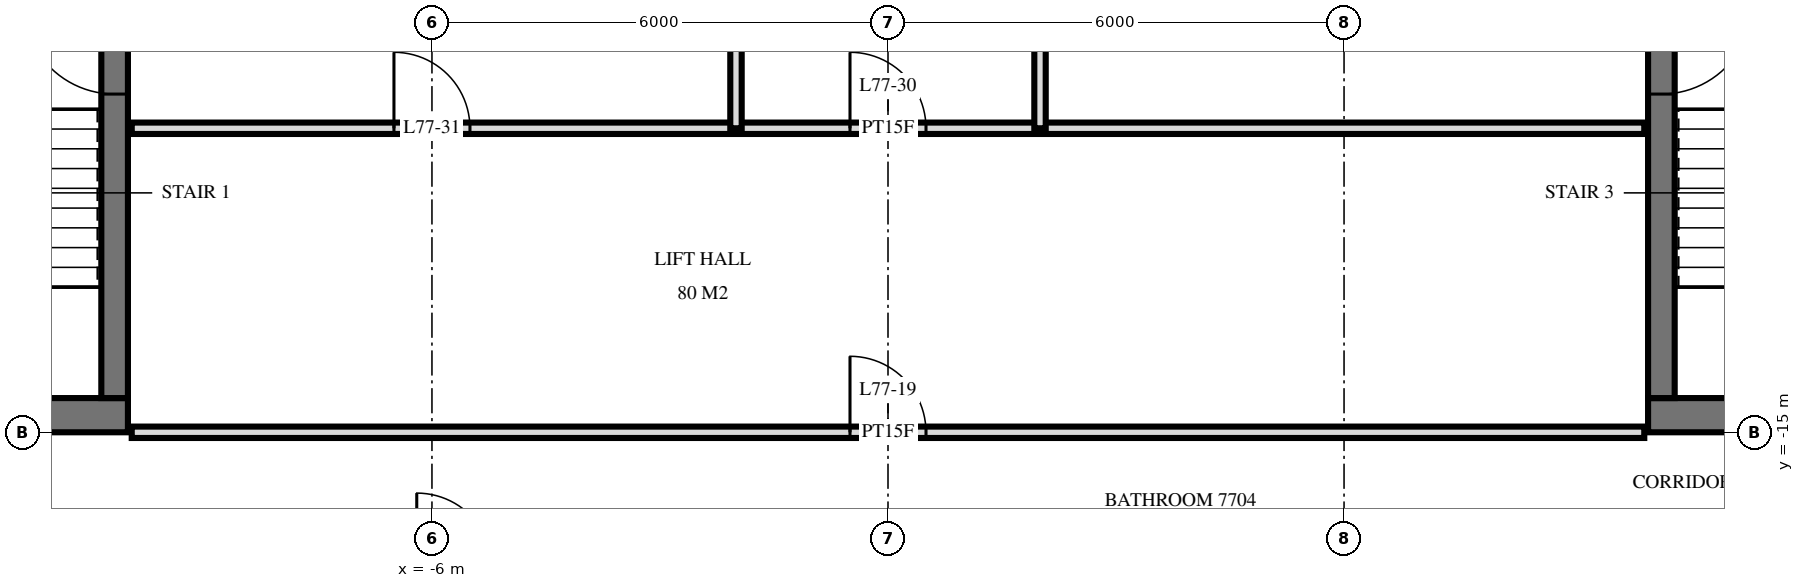
"""IFC4 building model, lengths in metres.
Left out: names, types, materials, properties, quantities, classifications, styles, units other than length and angle.
Written with IfcOpenShell. Run it as: python <this file> out.ifc"""

import sys

from ifc_helpers import new_model, si_unit, direction, frame, frame_2d, origin, place, context, subcontext, project, spatial, rectangle, extrude, element, fill, save


model = new_model("IFC4")
c1 = context("Model", 3, precision=1e-05, world=origin(), true_north=direction((0.0, 1.0)))
c2 = subcontext(c1, "Body", "Model", "MODEL_VIEW")
j1 = project(units=[si_unit("LENGTHUNIT", "METRE"), si_unit("PLANEANGLEUNIT", "RADIAN")], contexts=[c1])
p1 = place(None, origin())
s1 = spatial("IfcSite", under=j1, at=p1, CompositionType="ELEMENT")
p2 = place(p1, origin())
s2 = spatial("IfcBuilding", under=s1, at=p2, CompositionType="ELEMENT")
p3 = place(p2, frame((0.0, 0.0, 291.1)))
s3 = spatial("IfcBuildingStorey", under=s2, at=p3, CompositionType="ELEMENT", Elevation=291.1)
p4 = place(p3, frame((-19.5, -14.775, 0.0), z_axis=(0.0, 0.0, 1.0), x_axis=(1.0, 0.0, 0.0)))
e1 = element("IfcWall", 1, at=p4, inside=s3, PredefinedType="SHEAR", context=c2, shape_type="SweptSolid", body=[
    extrude(rectangle(XDim=9.5, YDim=0.45, at=frame_2d((4.75, 0.0))), origin(), (0.0, 0.0, 1.0), 3.5),
])
p5 = place(p4, frame((1.2, 0.0, 0.0)))
e2 = element("IfcOpeningElement", 2, at=p5, cuts=e1, PredefinedType="OPENING", context=c2, shape_type="SweptSolid", body=[
    extrude(rectangle(XDim=1.2, YDim=2.1, at=frame_2d((0.6, 1.05))), frame((0.0, 0.235, 0.0), z_axis=(0.0, -1.0, 0.0), x_axis=(1.0, 0.0, 0.0)), (0.0, 0.0, 1.0), 0.47),
])
p6 = place(p4, frame((4.25, 0.0, 0.0)))
e3 = element("IfcOpeningElement", 3, at=p6, cuts=e1, PredefinedType="OPENING", context=c2, shape_type="SweptSolid", body=[
    extrude(rectangle(XDim=1.1, YDim=2.1, at=frame_2d((0.55, 1.05))), frame((0.0, 0.235, 0.0), z_axis=(0.0, -1.0, 0.0), x_axis=(1.0, 0.0, 0.0)), (0.0, 0.0, 1.0), 0.47),
])
p7 = place(p3, frame((-10.175, -14.55, 0.0), z_axis=(0.0, 0.0, 1.0), x_axis=(0.0, 1.0, 0.0)))
e4 = element("IfcWall", 4, at=p7, inside=s3, PredefinedType="SHEAR", context=c2, shape_type="SweptSolid", body=[
    extrude(rectangle(XDim=14.1, YDim=0.35, at=frame_2d((7.05, 0.0))), origin(), (0.0, 0.0, 1.0), 3.5),
])
p8 = place(p7, frame((8.4, 0.0, 0.0)))
e5 = element("IfcOpeningElement", 5, at=p8, cuts=e4, PredefinedType="OPENING", context=c2, shape_type="SweptSolid", body=[
    extrude(rectangle(XDim=1.4, YDim=2.4, at=frame_2d((0.7, 1.2))), frame((0.0, 0.185, 0.0), z_axis=(0.0, -1.0, 0.0), x_axis=(1.0, 0.0, 0.0)), (0.0, 0.0, 1.0), 0.37),
])
p9 = place(p7, frame((10.0, 0.0, 0.0)))
e6 = element("IfcOpeningElement", 6, at=p9, cuts=e4, PredefinedType="OPENING", context=c2, shape_type="SweptSolid", body=[
    extrude(rectangle(XDim=1.4, YDim=2.4, at=frame_2d((0.7, 1.2))), frame((0.0, 0.185, 0.0), z_axis=(0.0, -1.0, 0.0), x_axis=(1.0, 0.0, 0.0)), (0.0, 0.0, 1.0), 0.37),
])
p10 = place(p7, frame((4.0, 0.0, 0.0)))
e7 = element("IfcOpeningElement", 7, at=p10, cuts=e4, PredefinedType="OPENING", context=c2, shape_type="SweptSolid", body=[
    extrude(rectangle(XDim=1.2, YDim=2.1, at=frame_2d((0.6, 1.05))), frame((0.0, 0.185, 0.0), z_axis=(0.0, -1.0, 0.0), x_axis=(1.0, 0.0, 0.0)), (0.0, 0.0, 1.0), 0.37),
])
p11 = place(p3, frame((10.0, -14.775, 0.0), z_axis=(0.0, 0.0, 1.0), x_axis=(1.0, 0.0, 0.0)))
e8 = element("IfcWall", 8, at=p11, inside=s3, PredefinedType="SHEAR", context=c2, shape_type="SweptSolid", body=[
    extrude(rectangle(XDim=9.5, YDim=0.45, at=frame_2d((4.75, 0.0))), origin(), (0.0, 0.0, 1.0), 3.5),
])
p12 = place(p11, frame((7.1, 0.0, 0.0)))
e9 = element("IfcOpeningElement", 9, at=p12, cuts=e8, PredefinedType="OPENING", context=c2, shape_type="SweptSolid", body=[
    extrude(rectangle(XDim=1.2, YDim=2.1, at=frame_2d((0.6, 1.05))), frame((0.0, 0.235, 0.0), z_axis=(0.0, -1.0, 0.0), x_axis=(1.0, 0.0, 0.0)), (0.0, 0.0, 1.0), 0.47),
])
p13 = place(p11, frame((4.15, 0.0, 0.0)))
e10 = element("IfcOpeningElement", 10, at=p13, cuts=e8, PredefinedType="OPENING", context=c2, shape_type="SweptSolid", body=[
    extrude(rectangle(XDim=1.1, YDim=2.1, at=frame_2d((0.55, 1.05))), frame((0.0, 0.235, 0.0), z_axis=(0.0, -1.0, 0.0), x_axis=(1.0, 0.0, 0.0)), (0.0, 0.0, 1.0), 0.47),
])
p14 = place(p3, frame((10.175, -14.55, 0.0), z_axis=(0.0, 0.0, 1.0), x_axis=(0.0, 1.0, 0.0)))
e11 = element("IfcWall", 11, at=p14, inside=s3, PredefinedType="SHEAR", context=c2, shape_type="SweptSolid", body=[
    extrude(rectangle(XDim=14.1, YDim=0.35, at=frame_2d((7.05, 0.0))), origin(), (0.0, 0.0, 1.0), 3.5),
])
p15 = place(p14, frame((8.4, 0.0, 0.0)))
e12 = element("IfcOpeningElement", 12, at=p15, cuts=e11, PredefinedType="OPENING", context=c2, shape_type="SweptSolid", body=[
    extrude(rectangle(XDim=1.4, YDim=2.4, at=frame_2d((0.7, 1.2))), frame((0.0, 0.185, 0.0), z_axis=(0.0, -1.0, 0.0), x_axis=(1.0, 0.0, 0.0)), (0.0, 0.0, 1.0), 0.37),
])
p16 = place(p14, frame((10.0, 0.0, 0.0)))
e13 = element("IfcOpeningElement", 13, at=p16, cuts=e11, PredefinedType="OPENING", context=c2, shape_type="SweptSolid", body=[
    extrude(rectangle(XDim=1.4, YDim=2.4, at=frame_2d((0.7, 1.2))), frame((0.0, 0.185, 0.0), z_axis=(0.0, -1.0, 0.0), x_axis=(1.0, 0.0, 0.0)), (0.0, 0.0, 1.0), 0.37),
])
p17 = place(p14, frame((4.0, 0.0, 0.0)))
e14 = element("IfcOpeningElement", 14, at=p17, cuts=e11, PredefinedType="OPENING", context=c2, shape_type="SweptSolid", body=[
    extrude(rectangle(XDim=1.2, YDim=2.1, at=frame_2d((0.6, 1.05))), frame((0.0, 0.185, 0.0), z_axis=(0.0, -1.0, 0.0), x_axis=(1.0, 0.0, 0.0)), (0.0, 0.0, 1.0), 0.37),
])
for number, where, z_axis, x_axis in (
    (15, (2.0, -11.0, 0.0), (0.0, 0.0, 1.0), (0.0, 1.0, 0.0)),
    (16, (-2.0, -11.0, 0.0), (0.0, 0.0, 1.0), (0.0, 1.0, 0.0)),
):
    element("IfcWall", number, at=place(p3, frame(where, z_axis=z_axis, x_axis=x_axis)), inside=s3, PredefinedType="PARTITIONING", context=c2, shape_type="SweptSolid", body=[
        extrude(rectangle(XDim=4.0, YDim=0.15, at=frame_2d((2.0, 0.0))), origin(), (0.0, 0.0, 1.0), 3.22),
    ])
p18 = place(p3, frame((-9.95, -15.0, 0.0), z_axis=(0.0, 0.0, 1.0), x_axis=(1.0, 0.0, 0.0)))
e17 = element("IfcWall", 17, at=p18, inside=s3, PredefinedType="PARTITIONING", context=c2, shape_type="SweptSolid", body=[
    extrude(rectangle(XDim=19.9, YDim=0.15, at=frame_2d((9.95, 0.0))), origin(), (0.0, 0.0, 1.0), 2.584),
])
p19 = place(p18, frame((9.45, 0.0, 0.0)))
e18 = element("IfcOpeningElement", 18, at=p19, cuts=e17, PredefinedType="OPENING", context=c2, shape_type="SweptSolid", body=[
    extrude(rectangle(XDim=1.0, YDim=2.1, at=frame_2d((0.5, 1.05))), frame((0.0, 0.085, 0.0), z_axis=(0.0, -1.0, 0.0), x_axis=(1.0, 0.0, 0.0)), (0.0, 0.0, 1.0), 0.17),
])
p20 = place(p3, frame((-9.95, -11.0, 0.0), z_axis=(0.0, 0.0, 1.0), x_axis=(1.0, 0.0, 0.0)))
e19 = element("IfcWall", 19, at=p20, inside=s3, PredefinedType="PARTITIONING", context=c2, shape_type="SweptSolid", body=[
    extrude(rectangle(XDim=19.9, YDim=0.15, at=frame_2d((9.95, 0.0))), origin(), (0.0, 0.0, 1.0), 3.22),
])
p21 = place(p20, frame((9.45, 0.0, 0.0)))
e20 = element("IfcOpeningElement", 20, at=p21, cuts=e19, PredefinedType="OPENING", context=c2, shape_type="SweptSolid", body=[
    extrude(rectangle(XDim=1.0, YDim=2.1, at=frame_2d((0.5, 1.05))), frame((0.0, 0.085, 0.0), z_axis=(0.0, -1.0, 0.0), x_axis=(1.0, 0.0, 0.0)), (0.0, 0.0, 1.0), 0.17),
])
p22 = place(p20, frame((3.45, 0.0, 0.0)))
e21 = element("IfcOpeningElement", 21, at=p22, cuts=e19, PredefinedType="OPENING", context=c2, shape_type="SweptSolid", body=[
    extrude(rectangle(XDim=1.0, YDim=2.1, at=frame_2d((0.5, 1.05))), frame((0.0, 0.085, 0.0), z_axis=(0.0, -1.0, 0.0), x_axis=(1.0, 0.0, 0.0)), (0.0, 0.0, 1.0), 0.17),
])
p23 = place(p10, origin())
e22 = element("IfcDoor", 22, at=p23, inside=s3, OperationType="SINGLE_SWING_LEFT", PredefinedType="DOOR", context=c2, shape_type="SweptSolid", body=[
    extrude(rectangle(XDim=1.2, YDim=2.1, at=frame_2d((0.6, 1.05))), frame((0.0, 0.025, 0.0), z_axis=(0.0, -1.0, 0.0), x_axis=(1.0, 0.0, 0.0)), (0.0, 0.0, 1.0), 0.05),
])
fill(e7, e22)
p24 = place(p17, frame((0.6, 0.0, 0.0), z_axis=(0.0, 0.0, 1.0), x_axis=(-1.0, 0.0, 0.0)))
e23 = element("IfcDoor", 23, at=p24, inside=s3, OperationType="SINGLE_SWING_RIGHT", PredefinedType="DOOR", context=c2, shape_type="SweptSolid", body=[
    extrude(rectangle(XDim=1.2, YDim=2.1, at=frame_2d((0.0, 1.05))), frame((0.0, -0.025, 0.0), z_axis=(0.0, 1.0, 0.0), x_axis=(-1.0, 0.0, 0.0)), (0.0, 0.0, 1.0), 0.05),
])
fill(e14, e23)
p25 = place(p19, origin())
e24 = element("IfcDoor", 24, at=p25, inside=s3, OperationType="SINGLE_SWING_RIGHT", PredefinedType="DOOR", context=c2, shape_type="SweptSolid", body=[
    extrude(rectangle(XDim=1.0, YDim=2.1, at=frame_2d((0.5, 1.05))), frame((0.0, 0.025, 0.0), z_axis=(0.0, -1.0, 0.0), x_axis=(1.0, 0.0, 0.0)), (0.0, 0.0, 1.0), 0.05),
])
fill(e18, e24)
p26 = place(p21, origin())
e25 = element("IfcDoor", 25, at=p26, inside=s3, OperationType="SINGLE_SWING_RIGHT", PredefinedType="DOOR", context=c2, shape_type="SweptSolid", body=[
    extrude(rectangle(XDim=1.0, YDim=2.1, at=frame_2d((0.5, 1.05))), frame((0.0, 0.025, 0.0), z_axis=(0.0, -1.0, 0.0), x_axis=(1.0, 0.0, 0.0)), (0.0, 0.0, 1.0), 0.05),
])
fill(e20, e25)
p27 = place(p22, origin())
e26 = element("IfcDoor", 26, at=p27, inside=s3, OperationType="SINGLE_SWING_RIGHT", PredefinedType="DOOR", context=c2, shape_type="SweptSolid", body=[
    extrude(rectangle(XDim=1.0, YDim=2.1, at=frame_2d((0.5, 1.05))), frame((0.0, 0.025, 0.0), z_axis=(0.0, -1.0, 0.0), x_axis=(1.0, 0.0, 0.0)), (0.0, 0.0, 1.0), 0.05),
])
fill(e21, e26)
save(model, sys.argv[1])
